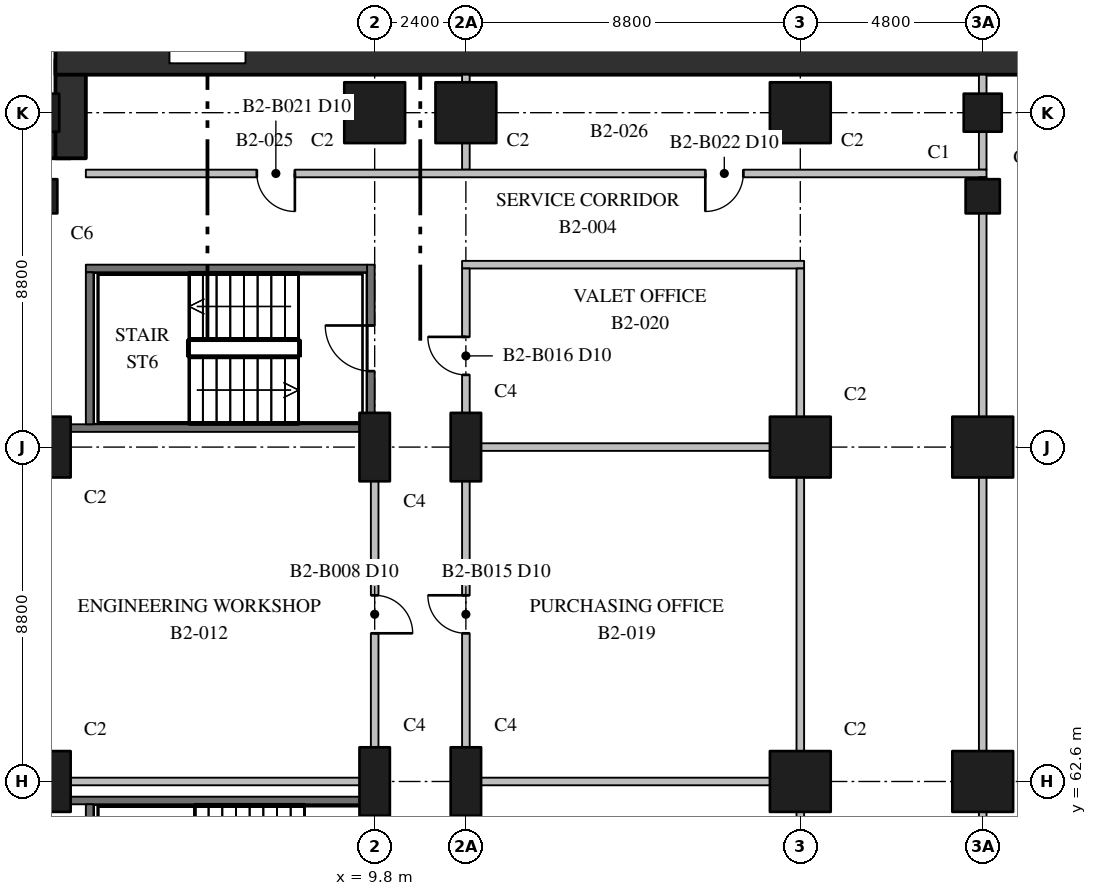
"""IFC4 building model, lengths in metres.
Left out: names, types, materials, properties, quantities, classifications, styles, units other than length and angle.
Written with IfcOpenShell. Run it as: python <this file> out.ifc"""

import sys

from ifc_helpers import new_model, si_unit, direction, frame, frame_2d, origin, origin_2d, place, context, subcontext, project, spatial, rectangle, extrude, element, fill, save


model = new_model("IFC4")
c1 = context("Model", 3, precision=1e-05, world=origin(), true_north=direction((0.0, 1.0)))
c2 = subcontext(c1, "Body", "Model", "MODEL_VIEW")
j1 = project(units=[si_unit("LENGTHUNIT", "METRE"), si_unit("PLANEANGLEUNIT", "RADIAN")], contexts=[c1])
p1 = place(None, origin())
s1 = spatial("IfcSite", under=j1, at=p1, CompositionType="ELEMENT")
p2 = place(p1, origin())
s2 = spatial("IfcBuilding", under=s1, at=p2, CompositionType="ELEMENT")
p3 = place(p2, frame((0.0, 0.0, -12.0)))
s3 = spatial("IfcBuildingStorey", under=s2, at=p3, CompositionType="ELEMENT", Elevation=-12.0)
for number, where, z_axis, x_axis in (
    (1, (1.0, 62.6, 0.0), (0.0, 0.0, 1.0), (1.0, 0.0, 0.0)),
    (2, (1.0, 71.4, 0.0), (0.0, 0.0, 1.0), (1.0, 0.0, 0.0)),
):
    element("IfcColumn", number, at=place(p3, frame(where, z_axis=z_axis, x_axis=x_axis)), inside=s3, PredefinedType="COLUMN", context=c2, shape_type="SweptSolid", body=[
        extrude(rectangle(XDim=1.6, YDim=1.6, at=origin_2d()), origin(), (0.0, 0.0, 1.0), 5.0),
    ])
p4 = place(p3, frame((1.0, 80.2, 0.0), z_axis=(0.0, 0.0, 1.0), x_axis=(1.0, 0.0, 0.0)))
e3 = element("IfcColumn", 3, at=p4, inside=s3, PredefinedType="COLUMN", context=c2, shape_type="SweptSolid", body=[
    extrude(rectangle(XDim=1.0, YDim=1.0, at=origin_2d()), origin(), (0.0, 0.0, 1.0), 5.0),
])
for number, where, z_axis, x_axis in (
    (4, (9.8, 62.6, 0.0), (0.0, 0.0, 1.0), (0.0, 1.0, 0.0)),
    (5, (9.8, 71.4, 0.0), (0.0, 0.0, 1.0), (0.0, 1.0, 0.0)),
):
    element("IfcColumn", number, at=place(p3, frame(where, z_axis=z_axis, x_axis=x_axis)), inside=s3, PredefinedType="COLUMN", context=c2, shape_type="SweptSolid", body=[
        extrude(rectangle(XDim=1.8, YDim=0.8, at=origin_2d()), origin(), (0.0, 0.0, 1.0), 5.0),
    ])
p5 = place(p3, frame((9.8, 80.2, 0.0), z_axis=(0.0, 0.0, 1.0), x_axis=(1.0, 0.0, 0.0)))
e6 = element("IfcColumn", 6, at=p5, inside=s3, PredefinedType="COLUMN", context=c2, shape_type="SweptSolid", body=[
    extrude(rectangle(XDim=1.6, YDim=1.6, at=origin_2d()), origin(), (0.0, 0.0, 1.0), 5.0),
])
for number, where, z_axis, x_axis in (
    (7, (12.2, 62.6, 0.0), (0.0, 0.0, 1.0), (0.0, 1.0, 0.0)),
    (8, (12.2, 71.4, 0.0), (0.0, 0.0, 1.0), (0.0, 1.0, 0.0)),
):
    element("IfcColumn", number, at=place(p3, frame(where, z_axis=z_axis, x_axis=x_axis)), inside=s3, PredefinedType="COLUMN", context=c2, shape_type="SweptSolid", body=[
        extrude(rectangle(XDim=1.8, YDim=0.8, at=origin_2d()), origin(), (0.0, 0.0, 1.0), 5.0),
    ])
for number, where, z_axis, x_axis in (
    (9, (12.2, 80.2, 0.0), (0.0, 0.0, 1.0), (1.0, 0.0, 0.0)),
    (10, (21.0, 62.6, 0.0), (0.0, 0.0, 1.0), (1.0, 0.0, 0.0)),
    (11, (21.0, 71.4, 0.0), (0.0, 0.0, 1.0), (1.0, 0.0, 0.0)),
    (12, (21.0, 80.2, 0.0), (0.0, 0.0, 1.0), (1.0, 0.0, 0.0)),
    (13, (25.8, 62.6, 0.0), (0.0, 0.0, 1.0), (1.0, 0.0, 0.0)),
    (14, (25.8, 71.4, 0.0), (0.0, 0.0, 1.0), (1.0, 0.0, 0.0)),
):
    element("IfcColumn", number, at=place(p3, frame(where, z_axis=z_axis, x_axis=x_axis)), inside=s3, PredefinedType="COLUMN", context=c2, shape_type="SweptSolid", body=[
        extrude(rectangle(XDim=1.6, YDim=1.6, at=origin_2d()), origin(), (0.0, 0.0, 1.0), 5.0),
    ])
p6 = place(p3, frame((25.8, 80.2, 0.0), z_axis=(0.0, 0.0, 1.0), x_axis=(1.0, 0.0, 0.0)))
e15 = element("IfcColumn", 15, at=p6, inside=s3, PredefinedType="COLUMN", context=c2, shape_type="SweptSolid", body=[
    extrude(rectangle(XDim=1.0, YDim=1.0, at=origin_2d()), origin(), (0.0, 0.0, 1.0), 5.0),
])
for number, where, z_axis, x_axis in (
    (16, (1.0, 78.0, 0.0), (0.0, 0.0, 1.0), (1.0, 0.0, 0.0)),
    (17, (25.8, 78.0, 0.0), (0.0, 0.0, 1.0), (1.0, 0.0, 0.0)),
):
    element("IfcColumn", number, at=place(p3, frame(where, z_axis=z_axis, x_axis=x_axis)), inside=s3, PredefinedType="COLUMN", context=c2, shape_type="SweptSolid", body=[
        extrude(rectangle(XDim=0.9, YDim=0.9, at=origin_2d()), origin(), (0.0, 0.0, 1.0), 5.0),
    ])
for number, where, z_axis, x_axis in (
    (18, (-0.8, 79.4, 0.0), (0.0, 0.0, 1.0), (1.0, 0.0, 0.0)),
    (19, (1.8, 79.0, 0.0), (0.0, 0.0, 1.0), (0.0, 1.0, 0.0)),
):
    element("IfcWall", number, at=place(p3, frame(where, z_axis=z_axis, x_axis=x_axis)), inside=s3, PredefinedType="SHEAR", context=c2, shape_type="SweptSolid", body=[
        extrude(rectangle(XDim=2.6, YDim=0.8, at=frame_2d((1.3, 0.0))), origin(), (0.0, 0.0, 1.0), 5.0),
    ])
p7 = place(p3, frame((1.4, 81.6, 0.0), z_axis=(0.0, 0.0, 1.0), x_axis=(1.0, 0.0, 0.0)))
e20 = element("IfcWall", 20, at=p7, inside=s3, PredefinedType="SHEAR", context=c2, shape_type="SweptSolid", body=[
    extrude(rectangle(XDim=78.0, YDim=0.8, at=frame_2d((39.0, 0.0))), origin(), (0.0, 0.0, 1.0), 5.0),
])
p8 = place(p3, frame((9.7, 57.8, 0.0), z_axis=(0.0, 0.0, 1.0), x_axis=(0.0, 1.0, 0.0)))
e21 = element("IfcWall", 21, at=p8, inside=s3, PredefinedType="SHEAR", context=c2, shape_type="SweptSolid", body=[
    extrude(rectangle(XDim=4.4, YDim=0.2, at=frame_2d((2.2, 0.0))), origin(), (0.0, 0.0, 1.0), 4.598),
])
p9 = place(p8, frame((1.6, 0.0, 0.0)))
e22 = element("IfcOpeningElement", 22, at=p9, cuts=e21, PredefinedType="OPENING", context=c2, shape_type="SweptSolid", body=[
    extrude(rectangle(XDim=1.2, YDim=2.1, at=frame_2d((0.6, 1.05))), frame((0.0, 0.11, 0.0), z_axis=(0.0, -1.0, 0.0), x_axis=(1.0, 0.0, 0.0)), (0.0, 0.0, 1.0), 0.22),
])
p10 = place(p3, frame((1.8, 62.1, 0.0), z_axis=(0.0, 0.0, 1.0), x_axis=(1.0, 0.0, 0.0)))
e23 = element("IfcWall", 23, at=p10, inside=s3, PredefinedType="SHEAR", context=c2, shape_type="SweptSolid", body=[
    extrude(rectangle(XDim=7.8, YDim=0.2, at=frame_2d((3.9, 0.0))), origin(), (0.0, 0.0, 1.0), 4.598),
])
p11 = place(p3, frame((2.3, 58.0, 0.0), z_axis=(0.0, 0.0, 1.0), x_axis=(0.0, 1.0, 0.0)))
e24 = element("IfcWall", 24, at=p11, inside=s3, PredefinedType="SHEAR", context=c2, shape_type="SweptSolid", body=[
    extrude(rectangle(XDim=4.0, YDim=0.2, at=frame_2d((2.0, 0.0))), origin(), (0.0, 0.0, 1.0), 4.598),
])
p12 = place(p3, frame((9.7, 71.8, 0.0), z_axis=(0.0, 0.0, 1.0), x_axis=(0.0, 1.0, 0.0)))
e25 = element("IfcWall", 25, at=p12, inside=s3, PredefinedType="SHEAR", context=c2, shape_type="SweptSolid", body=[
    extrude(rectangle(XDim=4.4, YDim=0.2, at=frame_2d((2.2, 0.0))), origin(), (0.0, 0.0, 1.0), 4.598),
])
p13 = place(p12, frame((1.6, 0.0, 0.0)))
e26 = element("IfcOpeningElement", 26, at=p13, cuts=e25, PredefinedType="OPENING", context=c2, shape_type="SweptSolid", body=[
    extrude(rectangle(XDim=1.2, YDim=2.1, at=frame_2d((0.6, 1.05))), frame((0.0, 0.11, 0.0), z_axis=(0.0, -1.0, 0.0), x_axis=(1.0, 0.0, 0.0)), (0.0, 0.0, 1.0), 0.22),
])
p14 = place(p3, frame((2.2, 76.1, 0.0), z_axis=(0.0, 0.0, 1.0), x_axis=(1.0, 0.0, 0.0)))
e27 = element("IfcWall", 27, at=p14, inside=s3, PredefinedType="SHEAR", context=c2, shape_type="SweptSolid", body=[
    extrude(rectangle(XDim=7.4, YDim=0.2, at=frame_2d((3.7, 0.0))), origin(), (0.0, 0.0, 1.0), 4.598),
])
p15 = place(p3, frame((1.8, 71.9, 0.0), z_axis=(0.0, 0.0, 1.0), x_axis=(1.0, 0.0, 0.0)))
e28 = element("IfcWall", 28, at=p15, inside=s3, PredefinedType="SHEAR", context=c2, shape_type="SweptSolid", body=[
    extrude(rectangle(XDim=7.8, YDim=0.2, at=frame_2d((3.9, 0.0))), origin(), (0.0, 0.0, 1.0), 4.598),
])
p16 = place(p3, frame((2.3, 72.0, 0.0), z_axis=(0.0, 0.0, 1.0), x_axis=(0.0, 1.0, 0.0)))
e29 = element("IfcWall", 29, at=p16, inside=s3, PredefinedType="SHEAR", context=c2, shape_type="SweptSolid", body=[
    extrude(rectangle(XDim=4.0, YDim=0.2, at=frame_2d((2.0, 0.0))), origin(), (0.0, 0.0, 1.0), 4.598),
])
p17 = place(p3, frame((12.1, 76.2, 0.0), z_axis=(0.0, 0.0, 1.0), x_axis=(1.0, 0.0, 0.0)))
e30 = element("IfcWall", 30, at=p17, inside=s3, PredefinedType="PARTITIONING", context=c2, shape_type="SweptSolid", body=[
    extrude(rectangle(XDim=9.0, YDim=0.2, at=frame_2d((4.5, 0.0))), origin(), (0.0, 0.0, 1.0), 4.598),
])
p18 = place(p3, frame((2.2, 78.6, 0.0), z_axis=(0.0, 0.0, 1.0), x_axis=(1.0, 0.0, 0.0)))
e31 = element("IfcWall", 31, at=p18, inside=s3, PredefinedType="PARTITIONING", context=c2, shape_type="SweptSolid", body=[
    extrude(rectangle(XDim=23.7, YDim=0.2, at=frame_2d((11.85, 0.0))), origin(), (0.0, 0.0, 1.0), 4.598),
])
p19 = place(p18, frame((4.5, 0.0, 0.0)))
e32 = element("IfcOpeningElement", 32, at=p19, cuts=e31, PredefinedType="OPENING", context=c2, shape_type="SweptSolid", body=[
    extrude(rectangle(XDim=1.0, YDim=2.1, at=frame_2d((0.5, 1.05))), frame((0.0, 0.11, 0.0), z_axis=(0.0, -1.0, 0.0), x_axis=(1.0, 0.0, 0.0)), (0.0, 0.0, 1.0), 0.22),
])
p20 = place(p18, frame((16.3, 0.0, 0.0)))
e33 = element("IfcOpeningElement", 33, at=p20, cuts=e31, PredefinedType="OPENING", context=c2, shape_type="SweptSolid", body=[
    extrude(rectangle(XDim=1.0, YDim=2.1, at=frame_2d((0.5, 1.05))), frame((0.0, 0.11, 0.0), z_axis=(0.0, -1.0, 0.0), x_axis=(1.0, 0.0, 0.0)), (0.0, 0.0, 1.0), 0.22),
])
p21 = place(p3, frame((0.0, 62.6, 0.0), z_axis=(0.0, 0.0, 1.0), x_axis=(1.0, 0.0, 0.0)))
e34 = element("IfcWall", 34, at=p21, inside=s3, PredefinedType="PARTITIONING", context=c2, shape_type="SweptSolid", body=[
    extrude(rectangle(XDim=9.7, YDim=0.2, at=frame_2d((4.85, 0.0))), origin(), (0.0, 0.0, 1.0), 4.598),
])
for number, where, z_axis, x_axis in (
    (35, (12.3, 62.6, 0.0), (0.0, 0.0, 1.0), (1.0, 0.0, 0.0)),
    (36, (12.3, 71.4, 0.0), (0.0, 0.0, 1.0), (1.0, 0.0, 0.0)),
):
    element("IfcWall", number, at=place(p3, frame(where, z_axis=z_axis, x_axis=x_axis)), inside=s3, PredefinedType="PARTITIONING", context=c2, shape_type="SweptSolid", body=[
        extrude(rectangle(XDim=8.6, YDim=0.2, at=frame_2d((4.3, 0.0))), origin(), (0.0, 0.0, 1.0), 4.598),
    ])
p22 = place(p3, frame((9.8, 62.2, 0.0), z_axis=(0.0, 0.0, 1.0), x_axis=(0.0, 1.0, 0.0)))
e37 = element("IfcWall", 37, at=p22, inside=s3, PredefinedType="PARTITIONING", context=c2, shape_type="SweptSolid", body=[
    extrude(rectangle(XDim=9.2, YDim=0.2, at=frame_2d((4.6, 0.0))), origin(), (0.0, 0.0, 1.0), 4.598),
])
p23 = place(p22, frame((4.3, 0.0, 0.0)))
e38 = element("IfcOpeningElement", 38, at=p23, cuts=e37, PredefinedType="OPENING", context=c2, shape_type="SweptSolid", body=[
    extrude(rectangle(XDim=1.0, YDim=2.1, at=frame_2d((0.5, 1.05))), frame((0.0, 0.11, 0.0), z_axis=(0.0, -1.0, 0.0), x_axis=(1.0, 0.0, 0.0)), (0.0, 0.0, 1.0), 0.22),
])
p24 = place(p3, frame((12.2, 12.3, 0.0), z_axis=(0.0, 0.0, 1.0), x_axis=(0.0, 1.0, 0.0)))
e39 = element("IfcWall", 39, at=p24, inside=s3, PredefinedType="PARTITIONING", context=c2, shape_type="SweptSolid", body=[
    extrude(rectangle(XDim=63.8, YDim=0.2, at=frame_2d((31.9, 0.0))), origin(), (0.0, 0.0, 1.0), 4.598),
])
p25 = place(p24, frame((3.4, 0.0, 0.0)))
e40 = element("IfcOpeningElement", 40, at=p25, cuts=e39, PredefinedType="OPENING", context=c2, shape_type="SweptSolid", body=[
    extrude(rectangle(XDim=1.0, YDim=2.1, at=frame_2d((0.5, 1.05))), frame((0.0, 0.11, 0.0), z_axis=(0.0, -1.0, 0.0), x_axis=(1.0, 0.0, 0.0)), (0.0, 0.0, 1.0), 0.22),
])
p26 = place(p24, frame((11.7, 0.0, 0.0)))
e41 = element("IfcOpeningElement", 41, at=p26, cuts=e39, PredefinedType="OPENING", context=c2, shape_type="SweptSolid", body=[
    extrude(rectangle(XDim=1.0, YDim=2.1, at=frame_2d((0.5, 1.05))), frame((0.0, 0.11, 0.0), z_axis=(0.0, -1.0, 0.0), x_axis=(1.0, 0.0, 0.0)), (0.0, 0.0, 1.0), 0.22),
])
p27 = place(p24, frame((19.2, 0.0, 0.0)))
e42 = element("IfcOpeningElement", 42, at=p27, cuts=e39, PredefinedType="OPENING", context=c2, shape_type="SweptSolid", body=[
    extrude(rectangle(XDim=1.0, YDim=2.1, at=frame_2d((0.5, 1.05))), frame((0.0, 0.11, 0.0), z_axis=(0.0, -1.0, 0.0), x_axis=(1.0, 0.0, 0.0)), (0.0, 0.0, 1.0), 0.22),
])
p28 = place(p24, frame((27.7, 0.0, 0.0)))
e43 = element("IfcOpeningElement", 43, at=p28, cuts=e39, PredefinedType="OPENING", context=c2, shape_type="SweptSolid", body=[
    extrude(rectangle(XDim=1.0, YDim=2.1, at=frame_2d((0.5, 1.05))), frame((0.0, 0.11, 0.0), z_axis=(0.0, -1.0, 0.0), x_axis=(1.0, 0.0, 0.0)), (0.0, 0.0, 1.0), 0.22),
])
p29 = place(p24, frame((36.3, 0.0, 0.0)))
e44 = element("IfcOpeningElement", 44, at=p29, cuts=e39, PredefinedType="OPENING", context=c2, shape_type="SweptSolid", body=[
    extrude(rectangle(XDim=1.0, YDim=2.1, at=frame_2d((0.5, 1.05))), frame((0.0, 0.11, 0.0), z_axis=(0.0, -1.0, 0.0), x_axis=(1.0, 0.0, 0.0)), (0.0, 0.0, 1.0), 0.22),
])
p30 = place(p24, frame((44.7, 0.0, 0.0)))
e45 = element("IfcOpeningElement", 45, at=p30, cuts=e39, PredefinedType="OPENING", context=c2, shape_type="SweptSolid", body=[
    extrude(rectangle(XDim=1.0, YDim=2.1, at=frame_2d((0.5, 1.05))), frame((0.0, 0.11, 0.0), z_axis=(0.0, -1.0, 0.0), x_axis=(1.0, 0.0, 0.0)), (0.0, 0.0, 1.0), 0.22),
])
p31 = place(p24, frame((54.2, 0.0, 0.0)))
e46 = element("IfcOpeningElement", 46, at=p31, cuts=e39, PredefinedType="OPENING", context=c2, shape_type="SweptSolid", body=[
    extrude(rectangle(XDim=1.0, YDim=2.1, at=frame_2d((0.5, 1.05))), frame((0.0, 0.11, 0.0), z_axis=(0.0, -1.0, 0.0), x_axis=(1.0, 0.0, 0.0)), (0.0, 0.0, 1.0), 0.22),
])
p32 = place(p24, frame((61.0, 0.0, 0.0)))
e47 = element("IfcOpeningElement", 47, at=p32, cuts=e39, PredefinedType="OPENING", context=c2, shape_type="SweptSolid", body=[
    extrude(rectangle(XDim=1.0, YDim=2.1, at=frame_2d((0.5, 1.05))), frame((0.0, 0.11, 0.0), z_axis=(0.0, -1.0, 0.0), x_axis=(1.0, 0.0, 0.0)), (0.0, 0.0, 1.0), 0.22),
])
p33 = place(p3, frame((12.2, 78.7, 0.0), z_axis=(0.0, 0.0, 1.0), x_axis=(0.0, 1.0, 0.0)))
e48 = element("IfcWall", 48, at=p33, inside=s3, PredefinedType="PARTITIONING", context=c2, shape_type="SweptSolid", body=[
    extrude(rectangle(XDim=2.5, YDim=0.2, at=frame_2d((1.25, 0.0))), origin(), (0.0, 0.0, 1.0), 4.598),
])
p34 = place(p3, frame((21.0, 12.3, 0.0), z_axis=(0.0, 0.0, 1.0), x_axis=(0.0, 1.0, 0.0)))
e49 = element("IfcWall", 49, at=p34, inside=s3, PredefinedType="PARTITIONING", context=c2, shape_type="SweptSolid", body=[
    extrude(rectangle(XDim=63.8, YDim=0.2, at=frame_2d((31.9, 0.0))), origin(), (0.0, 0.0, 1.0), 4.598),
])
p35 = place(p3, frame((25.8, 12.3, 0.0), z_axis=(0.0, 0.0, 1.0), x_axis=(0.0, 1.0, 0.0)))
e50 = element("IfcWall", 50, at=p35, inside=s3, PredefinedType="PARTITIONING", context=c2, shape_type="SweptSolid", body=[
    extrude(rectangle(XDim=66.2, YDim=0.2, at=frame_2d((33.1, 0.0))), origin(), (0.0, 0.0, 1.0), 4.598),
])
p36 = place(p35, frame((18.6, 0.0, 0.0)))
e51 = element("IfcOpeningElement", 51, at=p36, cuts=e50, PredefinedType="OPENING", context=c2, shape_type="SweptSolid", body=[
    extrude(rectangle(XDim=1.8, YDim=2.1, at=frame_2d((0.9, 1.05))), frame((0.0, 0.11, 0.0), z_axis=(0.0, -1.0, 0.0), x_axis=(1.0, 0.0, 0.0)), (0.0, 0.0, 1.0), 0.22),
])
p37 = place(p3, frame((25.8, 78.7, 0.0), z_axis=(0.0, 0.0, 1.0), x_axis=(0.0, 1.0, 0.0)))
e52 = element("IfcWall", 52, at=p37, inside=s3, PredefinedType="PARTITIONING", context=c2, shape_type="SweptSolid", body=[
    extrude(rectangle(XDim=2.5, YDim=0.2, at=frame_2d((1.25, 0.0))), origin(), (0.0, 0.0, 1.0), 4.598),
])
p38 = place(p13, origin())
e53 = element("IfcDoor", 53, at=p38, inside=s3, OperationType="SINGLE_SWING_RIGHT", PredefinedType="DOOR", context=c2, shape_type="SweptSolid", body=[
    extrude(rectangle(XDim=1.2, YDim=2.1, at=frame_2d((0.6, 1.05))), frame((0.0, 0.025, 0.0), z_axis=(0.0, -1.0, 0.0), x_axis=(1.0, 0.0, 0.0)), (0.0, 0.0, 1.0), 0.05),
])
fill(e26, e53)
p39 = place(p23, frame((1.0, 0.0, 0.0), z_axis=(0.0, 0.0, 1.0), x_axis=(-1.0, 0.0, 0.0)))
e54 = element("IfcDoor", 54, at=p39, inside=s3, OperationType="SINGLE_SWING_LEFT", PredefinedType="DOOR", context=c2, shape_type="SweptSolid", body=[
    extrude(rectangle(XDim=1.0, YDim=2.1, at=frame_2d((0.5, 1.05))), frame((0.0, 0.025, 0.0), z_axis=(0.0, -1.0, 0.0), x_axis=(1.0, 0.0, 0.0)), (0.0, 0.0, 1.0), 0.05),
])
fill(e38, e54)
p40 = place(p31, origin())
e55 = element("IfcDoor", 55, at=p40, inside=s3, OperationType="SINGLE_SWING_RIGHT", PredefinedType="DOOR", context=c2, shape_type="SweptSolid", body=[
    extrude(rectangle(XDim=1.0, YDim=2.1, at=frame_2d((0.5, 1.05))), frame((0.0, 0.025, 0.0), z_axis=(0.0, -1.0, 0.0), x_axis=(1.0, 0.0, 0.0)), (0.0, 0.0, 1.0), 0.05),
])
fill(e46, e55)
p41 = place(p32, origin())
e56 = element("IfcDoor", 56, at=p41, inside=s3, OperationType="SINGLE_SWING_RIGHT", PredefinedType="DOOR", context=c2, shape_type="SweptSolid", body=[
    extrude(rectangle(XDim=1.0, YDim=2.1, at=frame_2d((0.5, 1.05))), frame((0.0, 0.025, 0.0), z_axis=(0.0, -1.0, 0.0), x_axis=(1.0, 0.0, 0.0)), (0.0, 0.0, 1.0), 0.05),
])
fill(e47, e56)
p42 = place(p19, frame((1.0, 0.0, 0.0), z_axis=(0.0, 0.0, 1.0), x_axis=(-1.0, 0.0, 0.0)))
e57 = element("IfcDoor", 57, at=p42, inside=s3, OperationType="SINGLE_SWING_RIGHT", PredefinedType="DOOR", context=c2, shape_type="SweptSolid", body=[
    extrude(rectangle(XDim=1.0, YDim=2.1, at=frame_2d((0.5, 1.05))), frame((0.0, 0.025, 0.0), z_axis=(0.0, -1.0, 0.0), x_axis=(1.0, 0.0, 0.0)), (0.0, 0.0, 1.0), 0.05),
])
fill(e32, e57)
p43 = place(p20, frame((1.0, 0.0, 0.0), z_axis=(0.0, 0.0, 1.0), x_axis=(-1.0, 0.0, 0.0)))
e58 = element("IfcDoor", 58, at=p43, inside=s3, OperationType="SINGLE_SWING_LEFT", PredefinedType="DOOR", context=c2, shape_type="SweptSolid", body=[
    extrude(rectangle(XDim=1.0, YDim=2.1, at=frame_2d((0.5, 1.05))), frame((0.0, 0.025, 0.0), z_axis=(0.0, -1.0, 0.0), x_axis=(1.0, 0.0, 0.0)), (0.0, 0.0, 1.0), 0.05),
])
fill(e33, e58)
save(model, sys.argv[1])
